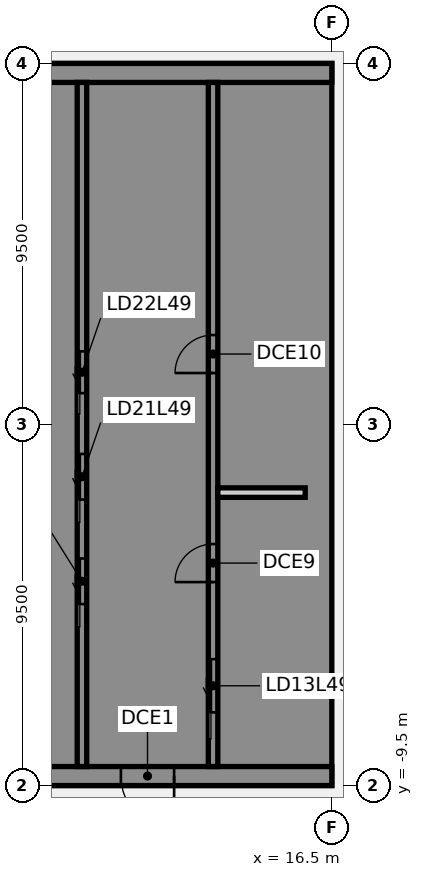
"""IFC4 building model, lengths in metres.
Left out: names, types, materials, properties, quantities, classifications, styles, units other than length and angle.
Written with IfcOpenShell. Run it as: python <this file> out.ifc"""

import sys

from ifc_helpers import new_model, si_unit, direction, frame, frame_2d, origin, place, context, subcontext, project, spatial, polyline, rectangle, outline, extrude, element, fill, save


model = new_model("IFC4")
c1 = context("Model", 3, precision=1e-05, world=origin(), true_north=direction((0.0, 1.0)))
c2 = subcontext(c1, "Body", "Model", "MODEL_VIEW")
j1 = project(units=[si_unit("LENGTHUNIT", "METRE"), si_unit("PLANEANGLEUNIT", "RADIAN")], contexts=[c1])
p1 = place(None, origin())
s1 = spatial("IfcSite", under=j1, at=p1, CompositionType="ELEMENT")
p2 = place(p1, origin())
s2 = spatial("IfcBuilding", under=s1, at=p2, CompositionType="ELEMENT")
p3 = place(p2, frame((0.0, 0.0, 196.9)))
s3 = spatial("IfcBuildingStorey", under=s2, at=p3, CompositionType="ELEMENT", Elevation=196.9)
p4 = place(p3, frame((16.5, -9.25, 0.0), z_axis=(0.0, 0.0, 1.0), x_axis=(-1.0, 0.0, 0.0)))
e1 = element("IfcWall", 1, at=p4, inside=s3, PredefinedType="SHEAR", context=c2, shape_type="SweptSolid", body=[
    extrude(rectangle(XDim=13.0, YDim=0.5, at=frame_2d((6.5, 0.0))), origin(), (0.0, 0.0, 1.0), 3.46),
])
p5 = place(p4, frame((4.15, 0.0, 0.0)))
e2 = element("IfcOpeningElement", 2, at=p5, cuts=e1, PredefinedType="OPENING", context=c2, shape_type="SweptSolid", body=[
    extrude(rectangle(XDim=1.4, YDim=2.1, at=frame_2d((0.7, 1.05))), frame((0.0, 0.26, 0.0), z_axis=(0.0, -1.0, 0.0), x_axis=(1.0, 0.0, 0.0)), (0.0, 0.0, 1.0), 0.52),
])
p6 = place(p4, frame((10.125, 0.0, 0.0)))
e3 = element("IfcOpeningElement", 3, at=p6, cuts=e1, PredefinedType="OPENING", context=c2, shape_type="SweptSolid", body=[
    extrude(rectangle(XDim=1.4, YDim=2.1, at=frame_2d((0.7, 1.05))), frame((0.0, 0.26, 0.0), z_axis=(0.0, -1.0, 0.0), x_axis=(1.0, 0.0, 0.0)), (0.0, 0.0, 1.0), 0.52),
])
p7 = place(p3, origin())
e4 = element("IfcWall", 4, at=p7, inside=s3, PredefinedType="SHEAR", context=c2, shape_type="SweptSolid", body=[
    extrude(outline(polyline([(13.5, -8.125), (13.5, -9.0), (16.0, -9.0), (16.5, -9.0), (16.5, 9.0), (16.0, 9.0), (13.5, 9.0), (13.5, 8.125), (16.0, 8.125), (16.0, 5.625), (13.5, 5.625), (13.5, 5.375), (16.0, 5.375), (16.0, -5.375), (13.5, -5.375), (13.5, -5.625), (16.0, -5.625), (16.0, -8.125), (13.5, -8.125)])), origin(), (0.0, 0.0, 1.0), 3.46),
])
p8 = place(p3, frame((16.5, 9.25, 0.0), z_axis=(0.0, 0.0, 1.0), x_axis=(-1.0, 0.0, 0.0)))
e5 = element("IfcWall", 5, at=p8, inside=s3, PredefinedType="SHEAR", context=c2, shape_type="SweptSolid", body=[
    extrude(rectangle(XDim=13.0, YDim=0.5, at=frame_2d((6.5, 0.0))), origin(), (0.0, 0.0, 1.0), 3.46),
])
p9 = place(p3, origin())
e6 = element("IfcWall", 6, at=p9, inside=s3, PredefinedType="SHEAR", context=c2, shape_type="SweptSolid", body=[
    extrude(outline(polyline([(9.8, -5.375), (7.5, -5.375), (7.5, -2.875), (9.8, -2.875), (9.8, -2.625), (7.5, -2.625), (7.5, -0.125), (9.8, -0.125), (9.8, 0.125), (7.5, 0.125), (7.5, 2.625), (9.8, 2.625), (9.8, 2.875), (7.5, 2.875), (7.5, 5.375), (9.8, 5.375), (9.8, 5.625), (7.5, 5.625), (7.5, 8.125), (9.8, 8.125), (9.8, 9.0), (7.5, 9.0), (7.25, 9.0), (7.25, -5.625), (7.5, -5.625), (9.8, -5.625), (9.8, -5.375)])), origin(), (0.0, 0.0, 1.0), 3.46),
])
p10 = place(p3, origin())
e7 = element("IfcWall", 7, at=p10, inside=s3, PredefinedType="SHEAR", context=c2, shape_type="SweptSolid", body=[
    extrude(outline(polyline([(7.5, -8.125), (7.5, -9.0), (9.8, -9.0), (9.8, -8.125), (9.8, -5.625), (9.55, -5.625), (9.55, -8.125), (7.5, -8.125)])), origin(), (0.0, 0.0, 1.0), 3.46),
])
p11 = place(p3, frame((13.375, -9.0, 0.0), z_axis=(0.0, 0.0, 1.0), x_axis=(0.0, 1.0, 0.0)))
e8 = element("IfcWall", 8, at=p11, inside=s3, PredefinedType="SHEAR", context=c2, shape_type="SweptSolid", body=[
    extrude(rectangle(XDim=18.0, YDim=0.25, at=frame_2d((9.0, 0.0))), origin(), (0.0, 0.0, 1.0), 3.46),
])
p12 = place(p11, frame((1.425, 0.0, 0.0)))
e9 = element("IfcOpeningElement", 9, at=p12, cuts=e8, PredefinedType="OPENING", context=c2, shape_type="SweptSolid", body=[
    extrude(rectangle(XDim=1.4, YDim=2.1, at=frame_2d((0.7, 1.05))), frame((0.0, 0.135, 0.0), z_axis=(0.0, -1.0, 0.0), x_axis=(1.0, 0.0, 0.0)), (0.0, 0.0, 1.0), 0.27),
])
p13 = place(p11, frame((4.854, 0.0, 0.0)))
e10 = element("IfcOpeningElement", 10, at=p13, cuts=e8, PredefinedType="OPENING", context=c2, shape_type="SweptSolid", body=[
    extrude(rectangle(XDim=1.0, YDim=2.1, at=frame_2d((0.5, 1.05))), frame((0.0, 0.135, 0.0), z_axis=(0.0, -1.0, 0.0), x_axis=(1.0, 0.0, 0.0)), (0.0, 0.0, 1.0), 0.27),
])
p14 = place(p11, frame((10.354, 0.0, 0.0)))
e11 = element("IfcOpeningElement", 11, at=p14, cuts=e8, PredefinedType="OPENING", context=c2, shape_type="SweptSolid", body=[
    extrude(rectangle(XDim=1.0, YDim=2.1, at=frame_2d((0.5, 1.05))), frame((0.0, 0.135, 0.0), z_axis=(0.0, -1.0, 0.0), x_axis=(1.0, 0.0, 0.0)), (0.0, 0.0, 1.0), 0.27),
])
p15 = place(p3, frame((9.925, -9.0, 0.0), z_axis=(0.0, 0.0, 1.0), x_axis=(0.0, 1.0, 0.0)))
e12 = element("IfcWall", 12, at=p15, inside=s3, PredefinedType="SHEAR", context=c2, shape_type="SweptSolid", body=[
    extrude(rectangle(XDim=18.0, YDim=0.25, at=frame_2d((9.0, 0.0))), origin(), (0.0, 0.0, 1.0), 3.46),
])
p16 = place(p15, frame((4.275, 0.0, 0.0)))
e13 = element("IfcOpeningElement", 13, at=p16, cuts=e12, PredefinedType="OPENING", context=c2, shape_type="SweptSolid", body=[
    extrude(rectangle(XDim=1.2, YDim=2.1, at=frame_2d((0.6, 1.05))), frame((0.0, 0.135, 0.0), z_axis=(0.0, -1.0, 0.0), x_axis=(1.0, 0.0, 0.0)), (0.0, 0.0, 1.0), 0.27),
])
p17 = place(p15, frame((7.025, 0.0, 0.0)))
e14 = element("IfcOpeningElement", 14, at=p17, cuts=e12, PredefinedType="OPENING", context=c2, shape_type="SweptSolid", body=[
    extrude(rectangle(XDim=1.2, YDim=2.1, at=frame_2d((0.6, 1.05))), frame((0.0, 0.135, 0.0), z_axis=(0.0, -1.0, 0.0), x_axis=(1.0, 0.0, 0.0)), (0.0, 0.0, 1.0), 0.27),
])
p18 = place(p15, frame((9.825, 0.0, 0.0)))
e15 = element("IfcOpeningElement", 15, at=p18, cuts=e12, PredefinedType="OPENING", context=c2, shape_type="SweptSolid", body=[
    extrude(rectangle(XDim=1.1, YDim=2.1, at=frame_2d((0.55, 1.05))), frame((0.0, 0.135, 0.0), z_axis=(0.0, -1.0, 0.0), x_axis=(1.0, 0.0, 0.0)), (0.0, 0.0, 1.0), 0.27),
])
p19 = place(p3, frame((15.8, -1.792, 0.0), z_axis=(0.0, 0.0, 1.0), x_axis=(-1.0, 0.0, 0.0)))
e16 = element("IfcWall", 16, at=p19, inside=s3, PredefinedType="PARTITIONING", context=c2, shape_type="SweptSolid", body=[
    extrude(rectangle(XDim=2.3, YDim=0.25, at=frame_2d((1.15, 0.0))), origin(), (0.0, 0.0, 1.0), 3.46),
])
p20 = place(p5, origin())
e17 = element("IfcDoor", 17, at=p20, inside=s3, OperationType="SINGLE_SWING_LEFT", PredefinedType="DOOR", context=c2, shape_type="SweptSolid", body=[
    extrude(rectangle(XDim=1.4, YDim=2.1, at=frame_2d((0.7, 1.05))), frame((0.0, 0.025, 0.0), z_axis=(0.0, -1.0, 0.0), x_axis=(1.0, 0.0, 0.0)), (0.0, 0.0, 1.0), 0.05),
])
fill(e2, e17)
p21 = place(p12, origin())
e18 = element("IfcDoor", 18, at=p21, inside=s3, OperationType="SLIDING_TO_LEFT", PredefinedType="DOOR", context=c2, shape_type="SweptSolid", body=[
    extrude(rectangle(XDim=1.4, YDim=2.1, at=frame_2d((0.7, 1.05))), frame((0.0, 0.025, 0.0), z_axis=(0.0, -1.0, 0.0), x_axis=(1.0, 0.0, 0.0)), (0.0, 0.0, 1.0), 0.05),
])
fill(e9, e18)
p22 = place(p16, origin())
e19 = element("IfcDoor", 19, at=p22, inside=s3, OperationType="SLIDING_TO_LEFT", PredefinedType="DOOR", context=c2, shape_type="SweptSolid", body=[
    extrude(rectangle(XDim=1.2, YDim=2.1, at=frame_2d((0.6, 1.05))), frame((0.0, 0.025, 0.0), z_axis=(0.0, -1.0, 0.0), x_axis=(1.0, 0.0, 0.0)), (0.0, 0.0, 1.0), 0.05),
])
fill(e13, e19)
p23 = place(p17, origin())
e20 = element("IfcDoor", 20, at=p23, inside=s3, OperationType="SLIDING_TO_LEFT", PredefinedType="DOOR", context=c2, shape_type="SweptSolid", body=[
    extrude(rectangle(XDim=1.2, YDim=2.1, at=frame_2d((0.6, 1.05))), frame((0.0, 0.025, 0.0), z_axis=(0.0, -1.0, 0.0), x_axis=(1.0, 0.0, 0.0)), (0.0, 0.0, 1.0), 0.05),
])
fill(e14, e20)
p24 = place(p18, origin())
e21 = element("IfcDoor", 21, at=p24, inside=s3, OperationType="SLIDING_TO_LEFT", PredefinedType="DOOR", context=c2, shape_type="SweptSolid", body=[
    extrude(rectangle(XDim=1.1, YDim=2.1, at=frame_2d((0.55, 1.05))), frame((0.0, 0.025, 0.0), z_axis=(0.0, -1.0, 0.0), x_axis=(1.0, 0.0, 0.0)), (0.0, 0.0, 1.0), 0.05),
])
fill(e15, e21)
p25 = place(p13, origin())
e22 = element("IfcDoor", 22, at=p25, inside=s3, OperationType="SINGLE_SWING_LEFT", PredefinedType="DOOR", context=c2, shape_type="SweptSolid", body=[
    extrude(rectangle(XDim=1.0, YDim=2.1, at=frame_2d((0.5, 1.05))), frame((0.0, 0.025, 0.0), z_axis=(0.0, -1.0, 0.0), x_axis=(1.0, 0.0, 0.0)), (0.0, 0.0, 1.0), 0.05),
])
fill(e10, e22)
p26 = place(p14, origin())
e23 = element("IfcDoor", 23, at=p26, inside=s3, OperationType="SINGLE_SWING_LEFT", PredefinedType="DOOR", context=c2, shape_type="SweptSolid", body=[
    extrude(rectangle(XDim=1.0, YDim=2.1, at=frame_2d((0.5, 1.05))), frame((0.0, 0.025, 0.0), z_axis=(0.0, -1.0, 0.0), x_axis=(1.0, 0.0, 0.0)), (0.0, 0.0, 1.0), 0.05),
])
fill(e11, e23)
save(model, sys.argv[1])
